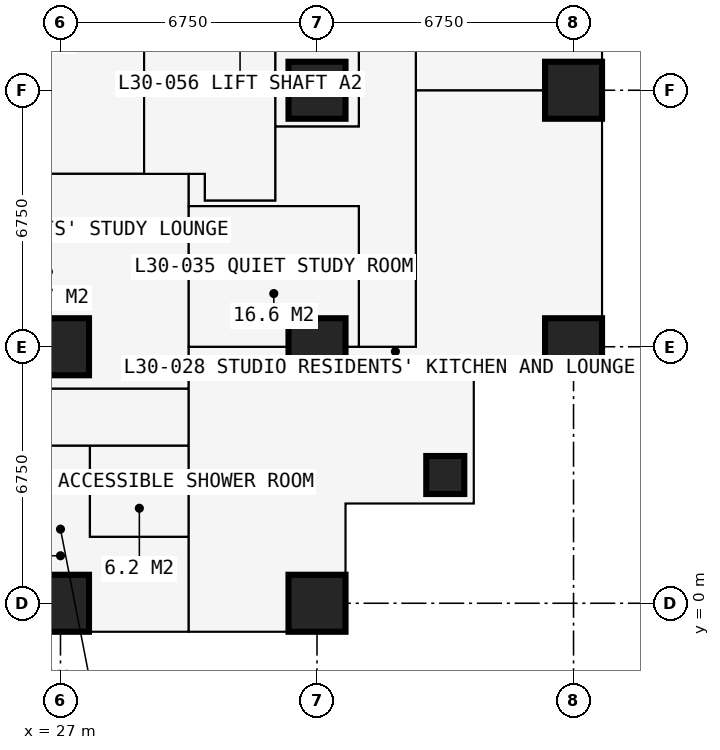
"""IFC4 building model, lengths in metres.
Left out: names, types, materials, properties, quantities, classifications, styles, units other than length and angle.
Written with IfcOpenShell. Run it as: python <this file> out.ifc"""

import sys

from ifc_helpers import new_model, si_unit, direction, frame, frame_2d, origin, origin_2d, place, context, subcontext, project, spatial, rectangle, extrude, element, fill, save


model = new_model("IFC4")
c1 = context("Model", 3, precision=1e-05, world=origin(), true_north=direction((0.0, 1.0)))
c2 = subcontext(c1, "Body", "Model", "MODEL_VIEW")
j1 = project(units=[si_unit("LENGTHUNIT", "METRE"), si_unit("PLANEANGLEUNIT", "RADIAN")], contexts=[c1])
p1 = place(None, origin())
s1 = spatial("IfcSite", under=j1, at=p1, CompositionType="ELEMENT")
p2 = place(p1, origin())
s2 = spatial("IfcBuilding", under=s1, at=p2, CompositionType="ELEMENT")
p3 = place(p2, frame((0.0, 0.0, 112.5)))
s3 = spatial("IfcBuildingStorey", under=s2, at=p3, CompositionType="ELEMENT", Elevation=112.5)
for number, where, z_axis, x_axis in (
    (1, (27.0, 0.0, 0.0), (0.0, 0.0, 1.0), (1.0, 0.0, 0.0)),
    (2, (27.0, 6.75, 0.0), (0.0, 0.0, 1.0), (1.0, 0.0, 0.0)),
    (3, (33.75, 0.0, 0.0), (0.0, 0.0, 1.0), (1.0, 0.0, 0.0)),
    (4, (33.75, 6.75, 0.0), (0.0, 0.0, 1.0), (1.0, 0.0, 0.0)),
    (5, (33.75, 13.5, 0.0), (0.0, 0.0, 1.0), (1.0, 0.0, 0.0)),
):
    element("IfcColumn", number, at=place(p3, frame(where, z_axis=z_axis, x_axis=x_axis)), inside=s3, PredefinedType="COLUMN", context=c2, shape_type="SweptSolid", body=[
        extrude(rectangle(XDim=1.5, YDim=1.5, at=origin_2d()), origin(), (0.0, 0.0, 1.0), 3.6),
    ])
p4 = place(p3, frame((37.125, 3.375, 0.0), z_axis=(0.0, 0.0, 1.0), x_axis=(1.0, 0.0, 0.0)))
e6 = element("IfcColumn", 6, at=p4, inside=s3, PredefinedType="COLUMN", context=c2, shape_type="SweptSolid", body=[
    extrude(rectangle(XDim=1.0, YDim=1.0, at=origin_2d()), origin(), (0.0, 0.0, 1.0), 3.6),
])
for number, where, z_axis, x_axis in (
    (7, (40.5, 6.75, 0.0), (0.0, 0.0, 1.0), (1.0, 0.0, 0.0)),
    (8, (40.5, 13.5, 0.0), (0.0, 0.0, 1.0), (1.0, 0.0, 0.0)),
):
    element("IfcColumn", number, at=place(p3, frame(where, z_axis=z_axis, x_axis=x_axis)), inside=s3, PredefinedType="COLUMN", context=c2, shape_type="SweptSolid", body=[
        extrude(rectangle(XDim=1.5, YDim=1.5, at=origin_2d()), origin(), (0.0, 0.0, 1.0), 3.6),
    ])
p5 = place(p3, frame((12.9, 13.5, 0.0), z_axis=(0.0, 0.0, 1.0), x_axis=(1.0, 0.0, 0.0)))
e9 = element("IfcWall", 9, at=p5, inside=s3, PredefinedType="SHEAR", context=c2, shape_type="SweptSolid", body=[
    extrude(rectangle(XDim=14.7, YDim=1.2, at=frame_2d((7.35, 0.0))), origin(), (0.0, 0.0, 1.0), 3.6),
])
p6 = place(p3, frame((27.0, 14.1, 0.0), z_axis=(0.0, 0.0, 1.0), x_axis=(0.0, 1.0, 0.0)))
e10 = element("IfcWall", 10, at=p6, inside=s3, PredefinedType="SHEAR", context=c2, shape_type="SweptSolid", body=[
    extrude(rectangle(XDim=12.3, YDim=1.2, at=frame_2d((6.15, 0.0))), origin(), (0.0, 0.0, 1.0), 3.6),
])
p7 = place(p6, frame((3.65, 0.0, 0.0)))
e11 = element("IfcOpeningElement", 11, at=p7, cuts=e10, PredefinedType="OPENING", context=c2, shape_type="SweptSolid", body=[
    extrude(rectangle(XDim=1.2, YDim=2.2, at=frame_2d((0.6, 1.1))), frame((0.0, 0.61, 0.0), z_axis=(0.0, -1.0, 0.0), x_axis=(1.0, 0.0, 0.0)), (0.0, 0.0, 1.0), 1.22),
])
p8 = place(p3, frame((27.0, -0.75, 0.0), z_axis=(0.0, 0.0, 1.0), x_axis=(-1.0, 0.0, 0.0)))
e12 = element("IfcWall", 12, at=p8, inside=s3, PredefinedType="SOLIDWALL", context=c2, shape_type="SweptSolid", body=[
    extrude(rectangle(XDim=6.75, YDim=0.15, at=frame_2d((3.375, 0.0))), origin(), (0.0, 0.0, 1.0), 3.375),
])
p9 = place(p8, frame((0.863, 0.0, 0.0)))
e13 = element("IfcOpeningElement", 13, at=p9, cuts=e12, PredefinedType="OPENING", context=c2, shape_type="SweptSolid", body=[
    extrude(rectangle(XDim=1.0, YDim=2.2, at=frame_2d((0.5, 1.1))), frame((0.0, 0.085, 0.0), z_axis=(0.0, -1.0, 0.0), x_axis=(1.0, 0.0, 0.0)), (0.0, 0.0, 1.0), 0.17),
])
p10 = place(p8, frame((1.975, 0.0, 0.9)))
e14 = element("IfcOpeningElement", 14, at=p10, cuts=e12, PredefinedType="OPENING", context=c2, shape_type="SweptSolid", body=[
    extrude(rectangle(XDim=1.2, YDim=1.8, at=frame_2d((0.6, 0.9))), frame((0.0, 0.085, 0.0), z_axis=(0.0, -1.0, 0.0), x_axis=(1.0, 0.0, 0.0)), (0.0, 0.0, 1.0), 0.17),
])
p11 = place(p8, frame((4.887, 0.0, 0.0)))
e15 = element("IfcOpeningElement", 15, at=p11, cuts=e12, PredefinedType="OPENING", context=c2, shape_type="SweptSolid", body=[
    extrude(rectangle(XDim=1.0, YDim=2.2, at=frame_2d((0.5, 1.1))), frame((0.0, 0.085, 0.0), z_axis=(0.0, -1.0, 0.0), x_axis=(1.0, 0.0, 0.0)), (0.0, 0.0, 1.0), 0.17),
])
p12 = place(p8, frame((3.575, 0.0, 0.9)))
e16 = element("IfcOpeningElement", 16, at=p12, cuts=e12, PredefinedType="OPENING", context=c2, shape_type="SweptSolid", body=[
    extrude(rectangle(XDim=1.2, YDim=1.8, at=frame_2d((0.6, 0.9))), frame((0.0, 0.085, 0.0), z_axis=(0.0, -1.0, 0.0), x_axis=(1.0, 0.0, 0.0)), (0.0, 0.0, 1.0), 0.17),
])
p13 = place(p3, frame((34.5, -0.75, 0.0), z_axis=(0.0, 0.0, 1.0), x_axis=(0.0, 1.0, 0.0)))
e17 = element("IfcWall", 17, at=p13, inside=s3, PredefinedType="SOLIDWALL", context=c2, shape_type="SweptSolid", body=[
    extrude(rectangle(XDim=3.375, YDim=0.3, at=frame_2d((1.688, 0.0))), origin(), (0.0, 0.0, 1.0), 3.375),
])
p14 = place(p13, frame((1.607, 0.0, 0.9)))
e18 = element("IfcOpeningElement", 18, at=p14, cuts=e17, PredefinedType="OPENING", context=c2, shape_type="SweptSolid", body=[
    extrude(rectangle(XDim=1.5, YDim=1.8, at=frame_2d((0.75, 0.9))), frame((0.0, 0.16, 0.0), z_axis=(0.0, -1.0, 0.0), x_axis=(1.0, 0.0, 0.0)), (0.0, 0.0, 1.0), 0.32),
])
p15 = place(p3, frame((34.5, 2.625, 0.0), z_axis=(0.0, 0.0, 1.0), x_axis=(1.0, 0.0, 0.0)))
e19 = element("IfcWall", 19, at=p15, inside=s3, PredefinedType="SOLIDWALL", context=c2, shape_type="SweptSolid", body=[
    extrude(rectangle(XDim=3.375, YDim=0.3, at=frame_2d((1.688, 0.0))), origin(), (0.0, 0.0, 1.0), 3.375),
])
p16 = place(p15, frame((0.788, 0.0, 0.6)))
e20 = element("IfcOpeningElement", 20, at=p16, cuts=e19, PredefinedType="OPENING", context=c2, shape_type="SweptSolid", body=[
    extrude(rectangle(XDim=1.8, YDim=2.1, at=frame_2d((0.9, 1.05))), frame((0.0, 0.16, 0.0), z_axis=(0.0, -1.0, 0.0), x_axis=(1.0, 0.0, 0.0)), (0.0, 0.0, 1.0), 0.32),
])
p17 = place(p3, frame((37.875, 2.625, 0.0), z_axis=(0.0, 0.0, 1.0), x_axis=(0.0, 1.0, 0.0)))
e21 = element("IfcWall", 21, at=p17, inside=s3, PredefinedType="SOLIDWALL", context=c2, shape_type="SweptSolid", body=[
    extrude(rectangle(XDim=3.375, YDim=0.3, at=frame_2d((1.688, 0.0))), origin(), (0.0, 0.0, 1.0), 3.375),
])
p18 = place(p17, frame((0.788, 0.0, 0.6)))
e22 = element("IfcOpeningElement", 22, at=p18, cuts=e21, PredefinedType="OPENING", context=c2, shape_type="SweptSolid", body=[
    extrude(rectangle(XDim=1.8, YDim=2.1, at=frame_2d((0.9, 1.05))), frame((0.0, 0.16, 0.0), z_axis=(0.0, -1.0, 0.0), x_axis=(1.0, 0.0, 0.0)), (0.0, 0.0, 1.0), 0.32),
])
p19 = place(p3, frame((37.875, 6.0, 0.0), z_axis=(0.0, 0.0, 1.0), x_axis=(1.0, 0.0, 0.0)))
e23 = element("IfcWall", 23, at=p19, inside=s3, PredefinedType="SOLIDWALL", context=c2, shape_type="SweptSolid", body=[
    extrude(rectangle(XDim=3.375, YDim=0.3, at=frame_2d((1.688, 0.0))), origin(), (0.0, 0.0, 1.0), 3.375),
])
p20 = place(p19, frame((0.268, 0.0, 0.9)))
e24 = element("IfcOpeningElement", 24, at=p20, cuts=e23, PredefinedType="OPENING", context=c2, shape_type="SweptSolid", body=[
    extrude(rectangle(XDim=1.5, YDim=1.8, at=frame_2d((0.75, 0.9))), frame((0.0, 0.16, 0.0), z_axis=(0.0, -1.0, 0.0), x_axis=(1.0, 0.0, 0.0)), (0.0, 0.0, 1.0), 0.32),
])
p21 = place(p3, frame((6.75, 4.15, 0.0), z_axis=(0.0, 0.0, 1.0), x_axis=(1.0, 0.0, 0.0)))
e25 = element("IfcWall", 25, at=p21, inside=s3, PredefinedType="PARTITIONING", context=c2, shape_type="SweptSolid", body=[
    extrude(rectangle(XDim=23.625, YDim=0.15, at=frame_2d((11.812, 0.0))), origin(), (0.0, 0.0, 1.0), 3.375),
])
p22 = place(p21, frame((1.2, 0.0, 0.0)))
e26 = element("IfcOpeningElement", 26, at=p22, cuts=e25, PredefinedType="OPENING", context=c2, shape_type="SweptSolid", body=[
    extrude(rectangle(XDim=1.0, YDim=2.2, at=frame_2d((0.5, 1.1))), frame((0.0, 0.085, 0.0), z_axis=(0.0, -1.0, 0.0), x_axis=(1.0, 0.0, 0.0)), (0.0, 0.0, 1.0), 0.17),
])
p23 = place(p21, frame((18.475, 0.0, 0.0)))
e27 = element("IfcOpeningElement", 27, at=p23, cuts=e25, PredefinedType="OPENING", context=c2, shape_type="SweptSolid", body=[
    extrude(rectangle(XDim=0.95, YDim=2.2, at=frame_2d((0.475, 1.1))), frame((0.0, 0.085, 0.0), z_axis=(0.0, -1.0, 0.0), x_axis=(1.0, 0.0, 0.0)), (0.0, 0.0, 1.0), 0.17),
])
p24 = place(p21, frame((11.725, 0.0, 0.0)))
e28 = element("IfcOpeningElement", 28, at=p24, cuts=e25, PredefinedType="OPENING", context=c2, shape_type="SweptSolid", body=[
    extrude(rectangle(XDim=0.95, YDim=2.2, at=frame_2d((0.475, 1.1))), frame((0.0, 0.085, 0.0), z_axis=(0.0, -1.0, 0.0), x_axis=(1.0, 0.0, 0.0)), (0.0, 0.0, 1.0), 0.17),
])
p25 = place(p21, frame((4.975, 0.0, 0.0)))
e29 = element("IfcOpeningElement", 29, at=p25, cuts=e25, PredefinedType="OPENING", context=c2, shape_type="SweptSolid", body=[
    extrude(rectangle(XDim=0.95, YDim=2.2, at=frame_2d((0.475, 1.1))), frame((0.0, 0.085, 0.0), z_axis=(0.0, -1.0, 0.0), x_axis=(1.0, 0.0, 0.0)), (0.0, 0.0, 1.0), 0.17),
])
p26 = place(p3, frame((10.125, 11.3, 0.0), z_axis=(0.0, 0.0, 1.0), x_axis=(1.0, 0.0, 0.0)))
e30 = element("IfcWall", 30, at=p26, inside=s3, PredefinedType="PARTITIONING", context=c2, shape_type="SweptSolid", body=[
    extrude(rectangle(XDim=20.675, YDim=0.15, at=frame_2d((10.337, 0.0))), origin(), (0.0, 0.0, 1.0), 3.375),
])
p27 = place(p26, frame((11.312, 0.0, 0.0)))
e31 = element("IfcOpeningElement", 31, at=p27, cuts=e30, PredefinedType="OPENING", context=c2, shape_type="SweptSolid", body=[
    extrude(rectangle(XDim=1.0, YDim=2.2, at=frame_2d((0.5, 1.1))), frame((0.0, 0.085, 0.0), z_axis=(0.0, -1.0, 0.0), x_axis=(1.0, 0.0, 0.0)), (0.0, 0.0, 1.0), 0.17),
])
p28 = place(p3, frame((22.988, 5.65, 0.0), z_axis=(0.0, 0.0, 1.0), x_axis=(1.0, 0.0, 0.0)))
e32 = element("IfcWall", 32, at=p28, inside=s3, PredefinedType="PARTITIONING", context=c2, shape_type="SweptSolid", body=[
    extrude(rectangle(XDim=7.387, YDim=0.15, at=frame_2d((3.694, 0.0))), origin(), (0.0, 0.0, 1.0), 3.375),
])
p29 = place(p28, frame((2.3, 0.0, 0.0)))
e33 = element("IfcOpeningElement", 33, at=p29, cuts=e32, PredefinedType="OPENING", context=c2, shape_type="SweptSolid", body=[
    extrude(rectangle(XDim=0.95, YDim=2.2, at=frame_2d((0.475, 1.1))), frame((0.0, 0.085, 0.0), z_axis=(0.0, -1.0, 0.0), x_axis=(1.0, 0.0, 0.0)), (0.0, 0.0, 1.0), 0.17),
])
p30 = place(p3, frame((27.775, 1.75, 0.0), z_axis=(0.0, 0.0, 1.0), x_axis=(0.0, 1.0, 0.0)))
e34 = element("IfcWall", 34, at=p30, inside=s3, PredefinedType="PARTITIONING", context=c2, shape_type="SweptSolid", body=[
    extrude(rectangle(XDim=2.4, YDim=0.1, at=frame_2d((1.2, 0.0))), origin(), (0.0, 0.0, 1.0), 3.375),
])
p31 = place(p3, frame((27.775, 1.75, 0.0), z_axis=(0.0, 0.0, 1.0), x_axis=(1.0, 0.0, 0.0)))
e35 = element("IfcWall", 35, at=p31, inside=s3, PredefinedType="PARTITIONING", context=c2, shape_type="SweptSolid", body=[
    extrude(rectangle(XDim=2.6, YDim=0.1, at=frame_2d((1.3, 0.0))), origin(), (0.0, 0.0, 1.0), 3.375),
])
p32 = place(p31, frame((0.85, 0.0, 0.0)))
e36 = element("IfcOpeningElement", 36, at=p32, cuts=e35, PredefinedType="OPENING", context=c2, shape_type="SweptSolid", body=[
    extrude(rectangle(XDim=0.9, YDim=2.2, at=frame_2d((0.45, 1.1))), frame((0.0, 0.06, 0.0), z_axis=(0.0, -1.0, 0.0), x_axis=(1.0, 0.0, 0.0)), (0.0, 0.0, 1.0), 0.12),
])
p33 = place(p3, frame((29.2, 11.3, 0.0), z_axis=(0.0, 0.0, 1.0), x_axis=(0.0, 1.0, 0.0)))
e37 = element("IfcWall", 37, at=p33, inside=s3, PredefinedType="PARTITIONING", context=c2, shape_type="SweptSolid", body=[
    extrude(rectangle(XDim=17.9, YDim=0.2, at=frame_2d((8.95, 0.0))), origin(), (0.0, 0.0, 1.0), 3.375),
])
p34 = place(p33, frame((8.35, 0.0, 0.0)))
e38 = element("IfcOpeningElement", 38, at=p34, cuts=e37, PredefinedType="OPENING", context=c2, shape_type="SweptSolid", body=[
    extrude(rectangle(XDim=1.2, YDim=2.2, at=frame_2d((0.6, 1.1))), frame((0.0, 0.11, 0.0), z_axis=(0.0, -1.0, 0.0), x_axis=(1.0, 0.0, 0.0)), (0.0, 0.0, 1.0), 0.22),
])
p35 = place(p3, frame((30.375, -0.734, 0.0), z_axis=(0.0, 0.0, 1.0), x_axis=(0.0, 1.0, 0.0)))
e39 = element("IfcWall", 39, at=p35, inside=s3, PredefinedType="PARTITIONING", context=c2, shape_type="SweptSolid", body=[
    extrude(rectangle(XDim=12.034, YDim=0.15, at=frame_2d((6.017, 0.0))), origin(), (0.0, 0.0, 1.0), 3.375),
])
p36 = place(p35, frame((5.134, 0.0, 0.0)))
e40 = element("IfcOpeningElement", 40, at=p36, cuts=e39, PredefinedType="OPENING", context=c2, shape_type="SweptSolid", body=[
    extrude(rectangle(XDim=1.0, YDim=2.2, at=frame_2d((0.5, 1.1))), frame((0.0, 0.085, 0.0), z_axis=(0.0, -1.0, 0.0), x_axis=(1.0, 0.0, 0.0)), (0.0, 0.0, 1.0), 0.17),
])
p37 = place(p3, frame((30.375, 6.75, 0.0), z_axis=(0.0, 0.0, 1.0), x_axis=(1.0, 0.0, 0.0)))
e41 = element("IfcWall", 41, at=p37, inside=s3, PredefinedType="PARTITIONING", context=c2, shape_type="SweptSolid", body=[
    extrude(rectangle(XDim=5.975, YDim=0.15, at=frame_2d((2.988, 0.0))), origin(), (0.0, 0.0, 1.0), 2.877),
])
p38 = place(p3, frame((30.375, 10.45, 0.0), z_axis=(0.0, 0.0, 1.0), x_axis=(1.0, 0.0, 0.0)))
e42 = element("IfcWall", 42, at=p38, inside=s3, PredefinedType="PARTITIONING", context=c2, shape_type="SweptSolid", body=[
    extrude(rectangle(XDim=4.475, YDim=0.15, at=frame_2d((2.238, 0.0))), origin(), (0.0, 0.0, 1.0), 3.375),
])
p39 = place(p38, frame((2.35, 0.0, 0.0)))
e43 = element("IfcOpeningElement", 43, at=p39, cuts=e42, PredefinedType="OPENING", context=c2, shape_type="SweptSolid", body=[
    extrude(rectangle(XDim=0.95, YDim=2.2, at=frame_2d((0.475, 1.1))), frame((0.0, 0.085, 0.0), z_axis=(0.0, -1.0, 0.0), x_axis=(1.0, 0.0, 0.0)), (0.0, 0.0, 1.0), 0.17),
])
p40 = place(p3, frame((30.8, 10.6, 0.0), z_axis=(0.0, 0.0, 1.0), x_axis=(0.0, 1.0, 0.0)))
e44 = element("IfcWall", 44, at=p40, inside=s3, PredefinedType="PARTITIONING", context=c2, shape_type="SweptSolid", body=[
    extrude(rectangle(XDim=0.7, YDim=0.15, at=frame_2d((0.35, 0.0))), origin(), (0.0, 0.0, 1.0), 3.375),
])
p41 = place(p3, frame((30.8, 10.6, 0.0), z_axis=(0.0, 0.0, 1.0), x_axis=(1.0, 0.0, 0.0)))
e45 = element("IfcWall", 45, at=p41, inside=s3, PredefinedType="PARTITIONING", context=c2, shape_type="SweptSolid", body=[
    extrude(rectangle(XDim=1.85, YDim=0.15, at=frame_2d((0.925, 0.0))), origin(), (0.0, 0.0, 1.0), 3.375),
])
p42 = place(p3, frame((32.65, 10.6, 0.0), z_axis=(0.0, 0.0, 1.0), x_axis=(0.0, 1.0, 0.0)))
e46 = element("IfcWall", 46, at=p42, inside=s3, PredefinedType="SHEAR", context=c2, shape_type="SweptSolid", body=[
    extrude(rectangle(XDim=9.3, YDim=0.1, at=frame_2d((4.65, 0.0))), origin(), (0.0, 0.0, 1.0), 3.375),
])
p43 = place(p42, frame((0.5, 0.0, 0.0)))
e47 = element("IfcOpeningElement", 47, at=p43, cuts=e46, PredefinedType="OPENING", context=c2, shape_type="SweptSolid", body=[
    extrude(rectangle(XDim=1.0, YDim=2.2, at=frame_2d((0.5, 1.1))), frame((0.0, 0.06, 0.0), z_axis=(0.0, -1.0, 0.0), x_axis=(1.0, 0.0, 0.0)), (0.0, 0.0, 1.0), 0.12),
])
p44 = place(p3, frame((32.65, 12.55, 0.0), z_axis=(0.0, 0.0, 1.0), x_axis=(1.0, 0.0, 0.0)))
e48 = element("IfcWall", 48, at=p44, inside=s3, PredefinedType="PARTITIONING", context=c2, shape_type="SweptSolid", body=[
    extrude(rectangle(XDim=2.2, YDim=0.15, at=frame_2d((1.1, 0.0))), origin(), (0.0, 0.0, 1.0), 3.375),
])
p45 = place(p3, frame((34.85, 6.75, 0.0), z_axis=(0.0, 0.0, 1.0), x_axis=(0.0, 1.0, 0.0)))
e49 = element("IfcWall", 49, at=p45, inside=s3, PredefinedType="PARTITIONING", context=c2, shape_type="SweptSolid", body=[
    extrude(rectangle(XDim=3.7, YDim=0.15, at=frame_2d((1.85, 0.0))), origin(), (0.0, 0.0, 1.0), 3.375),
])
p46 = place(p3, frame((34.85, 12.55, 0.0), z_axis=(0.0, 0.0, 1.0), x_axis=(0.0, 1.0, 0.0)))
e50 = element("IfcWall", 50, at=p46, inside=s3, PredefinedType="PARTITIONING", context=c2, shape_type="SweptSolid", body=[
    extrude(rectangle(XDim=17.825, YDim=0.15, at=frame_2d((8.913, 0.0))), origin(), (0.0, 0.0, 1.0), 3.375),
])
p47 = place(p46, frame((8.5, 0.0, 0.0)))
e51 = element("IfcOpeningElement", 51, at=p47, cuts=e50, PredefinedType="OPENING", context=c2, shape_type="SweptSolid", body=[
    extrude(rectangle(XDim=0.95, YDim=2.2, at=frame_2d((0.475, 1.1))), frame((0.0, 0.085, 0.0), z_axis=(0.0, -1.0, 0.0), x_axis=(1.0, 0.0, 0.0)), (0.0, 0.0, 1.0), 0.17),
])
p48 = place(p3, frame((36.35, 6.75, 0.0), z_axis=(0.0, 0.0, 1.0), x_axis=(0.0, 1.0, 0.0)))
e52 = element("IfcWall", 52, at=p48, inside=s3, PredefinedType="PARTITIONING", context=c2, shape_type="SweptSolid", body=[
    extrude(rectangle(XDim=20.25, YDim=0.15, at=frame_2d((10.125, 0.0))), origin(), (0.0, 0.0, 1.0), 3.375),
])
p49 = place(p48, frame((15.1, 0.0, 0.0)))
e53 = element("IfcOpeningElement", 53, at=p49, cuts=e52, PredefinedType="OPENING", context=c2, shape_type="SweptSolid", body=[
    extrude(rectangle(XDim=0.95, YDim=2.2, at=frame_2d((0.475, 1.1))), frame((0.0, 0.085, 0.0), z_axis=(0.0, -1.0, 0.0), x_axis=(1.0, 0.0, 0.0)), (0.0, 0.0, 1.0), 0.17),
])
p50 = place(p48, frame((8.35, 0.0, 0.0)))
e54 = element("IfcOpeningElement", 54, at=p50, cuts=e52, PredefinedType="OPENING", context=c2, shape_type="SweptSolid", body=[
    extrude(rectangle(XDim=0.95, YDim=2.2, at=frame_2d((0.475, 1.1))), frame((0.0, 0.085, 0.0), z_axis=(0.0, -1.0, 0.0), x_axis=(1.0, 0.0, 0.0)), (0.0, 0.0, 1.0), 0.17),
])
p51 = place(p3, frame((36.35, 13.5, 0.0), z_axis=(0.0, 0.0, 1.0), x_axis=(1.0, 0.0, 0.0)))
e55 = element("IfcWall", 55, at=p51, inside=s3, PredefinedType="PARTITIONING", context=c2, shape_type="SweptSolid", body=[
    extrude(rectangle(XDim=4.884, YDim=0.15, at=frame_2d((2.442, 0.0))), origin(), (0.0, 0.0, 1.0), 2.61),
])
p52 = place(p14, origin())
e56 = element("IfcWindow", 56, at=p52, inside=s3, PartitioningType="SINGLE_PANEL", PredefinedType="WINDOW", context=c2, shape_type="SweptSolid", body=[
    extrude(rectangle(XDim=1.5, YDim=1.8, at=frame_2d((0.75, 0.9))), frame((0.0, 0.03, 0.0), z_axis=(0.0, -1.0, 0.0), x_axis=(1.0, 0.0, 0.0)), (0.0, 0.0, 1.0), 0.06),
])
fill(e18, e56)
p53 = place(p16, origin())
e57 = element("IfcWindow", 57, at=p53, inside=s3, PartitioningType="SINGLE_PANEL", PredefinedType="WINDOW", context=c2, shape_type="SweptSolid", body=[
    extrude(rectangle(XDim=1.8, YDim=2.1, at=frame_2d((0.9, 1.05))), frame((0.0, 0.03, 0.0), z_axis=(0.0, -1.0, 0.0), x_axis=(1.0, 0.0, 0.0)), (0.0, 0.0, 1.0), 0.06),
])
fill(e20, e57)
p54 = place(p18, origin())
e58 = element("IfcWindow", 58, at=p54, inside=s3, PartitioningType="SINGLE_PANEL", PredefinedType="WINDOW", context=c2, shape_type="SweptSolid", body=[
    extrude(rectangle(XDim=1.8, YDim=2.1, at=frame_2d((0.9, 1.05))), frame((0.0, 0.03, 0.0), z_axis=(0.0, -1.0, 0.0), x_axis=(1.0, 0.0, 0.0)), (0.0, 0.0, 1.0), 0.06),
])
fill(e22, e58)
p55 = place(p20, origin())
e59 = element("IfcWindow", 59, at=p55, inside=s3, PartitioningType="SINGLE_PANEL", PredefinedType="WINDOW", context=c2, shape_type="SweptSolid", body=[
    extrude(rectangle(XDim=1.5, YDim=1.8, at=frame_2d((0.75, 0.9))), frame((0.0, 0.03, 0.0), z_axis=(0.0, -1.0, 0.0), x_axis=(1.0, 0.0, 0.0)), (0.0, 0.0, 1.0), 0.06),
])
fill(e24, e59)
p56 = place(p32, origin())
e60 = element("IfcDoor", 60, at=p56, inside=s3, OperationType="SINGLE_SWING_RIGHT", PredefinedType="DOOR", context=c2, shape_type="SweptSolid", body=[
    extrude(rectangle(XDim=0.9, YDim=2.2, at=frame_2d((0.45, 1.1))), frame((0.0, 0.025, 0.0), z_axis=(0.0, -1.0, 0.0), x_axis=(1.0, 0.0, 0.0)), (0.0, 0.0, 1.0), 0.05),
])
fill(e36, e60)
p57 = place(p36, origin())
e61 = element("IfcDoor", 61, at=p57, inside=s3, OperationType="SINGLE_SWING_LEFT", PredefinedType="DOOR", context=c2, shape_type="SweptSolid", body=[
    extrude(rectangle(XDim=1.0, YDim=2.2, at=frame_2d((0.5, 1.1))), frame((0.0, 0.025, 0.0), z_axis=(0.0, -1.0, 0.0), x_axis=(1.0, 0.0, 0.0)), (0.0, 0.0, 1.0), 0.05),
])
fill(e40, e61)
p58 = place(p43, origin())
e62 = element("IfcDoor", 62, at=p58, inside=s3, OperationType="SINGLE_SWING_LEFT", PredefinedType="DOOR", context=c2, shape_type="SweptSolid", body=[
    extrude(rectangle(XDim=1.0, YDim=2.2, at=frame_2d((0.5, 1.1))), frame((0.0, 0.025, 0.0), z_axis=(0.0, -1.0, 0.0), x_axis=(1.0, 0.0, 0.0)), (0.0, 0.0, 1.0), 0.05),
])
fill(e47, e62)
p59 = place(p39, origin())
e63 = element("IfcDoor", 63, at=p59, inside=s3, OperationType="SINGLE_SWING_LEFT", PredefinedType="DOOR", context=c2, shape_type="SweptSolid", body=[
    extrude(rectangle(XDim=0.95, YDim=2.2, at=frame_2d((0.475, 1.1))), frame((0.0, 0.025, 0.0), z_axis=(0.0, -1.0, 0.0), x_axis=(1.0, 0.0, 0.0)), (0.0, 0.0, 1.0), 0.05),
])
fill(e43, e63)
save(model, sys.argv[1])
